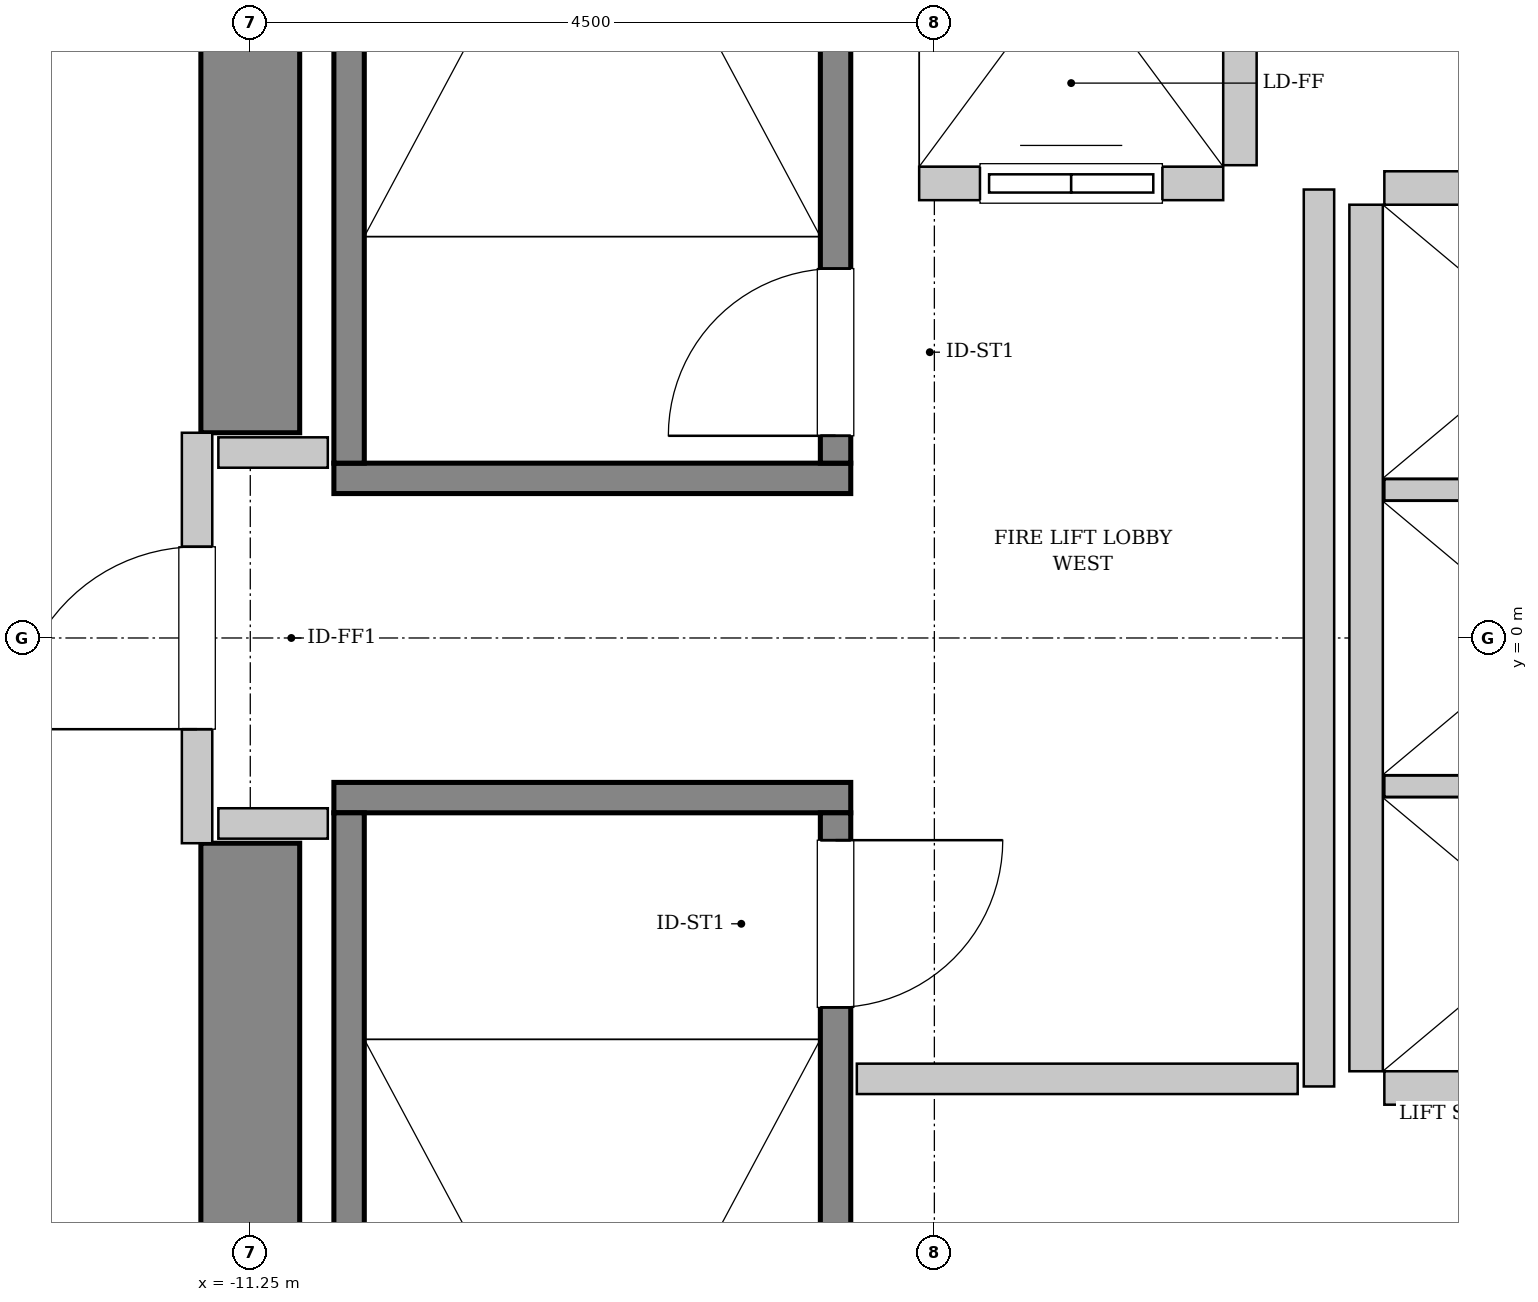
"""IFC4 building model, lengths in metres.
Left out: names, types, materials, properties, quantities, classifications, styles, units other than length and angle.
Written with IfcOpenShell. Run it as: python <this file> out.ifc"""

import sys

from ifc_helpers import new_model, si_unit, direction, frame, frame_2d, origin, place, context, subcontext, project, spatial, rectangle, extrude, source, transform, mapped, element, fill, save


model = new_model("IFC4")
c1 = context("Model", 3, precision=1e-05, world=origin(), true_north=direction((0.0, 1.0)))
c2 = subcontext(c1, "Body", "Model", "MODEL_VIEW")
j1 = project(units=[si_unit("LENGTHUNIT", "METRE"), si_unit("PLANEANGLEUNIT", "RADIAN")], contexts=[c1])
p1 = place(None, origin())
s1 = spatial("IfcSite", under=j1, at=p1, CompositionType="ELEMENT")
p2 = place(p1, origin())
s2 = spatial("IfcBuilding", under=s1, at=p2, CompositionType="ELEMENT")
p3 = place(p2, frame((0.0, 0.0, 16.8)))
s3 = spatial("IfcBuildingStorey", under=s2, at=p3, CompositionType="ELEMENT", Elevation=16.8)
m1 = source(origin(), c2, "Body", "SweptSolid", [
    extrude(rectangle(XDim=7.325, YDim=0.65, at=frame_2d((3.663, 0.0))), origin(), (0.0, 0.0, 1.0), 5.4),
])
for number, where, z_axis, x_axis in (
    (1, (-11.25, -8.675, 0.0), (0.0, 0.0, 1.0), (0.0, 1.0, 0.0)),
    (2, (-11.25, 1.35, 0.0), (0.0, 0.0, 1.0), (0.0, 1.0, 0.0)),
):
    element("IfcWall", number, at=place(p3, frame(where, z_axis=z_axis, x_axis=x_axis)), inside=s3, PredefinedType="SHEAR", context=c2, shape_type="MappedRepresentation", body=[
        mapped(m1, transform((0.0, 0.0, 0.0), x_axis=(1.0, 0.0, 0.0), y_axis=(0.0, 1.0, 0.0), z_axis=(0.0, 0.0, 1.0), scale=1.0)),
    ])
m2 = source(origin(), c2, "Body", "SweptSolid", [
    extrude(rectangle(XDim=3.4, YDim=0.2, at=frame_2d((1.7, 0.0))), origin(), (0.0, 0.0, 1.0), 5.4),
])
p4 = place(p3, frame((-7.3, 1.05, 0.0), z_axis=(0.0, 0.0, 1.0), x_axis=(-1.0, 0.0, 0.0)))
e3 = element("IfcWall", 3, at=p4, inside=s3, PredefinedType="SOLIDWALL", context=c2, shape_type="MappedRepresentation", body=[
    mapped(m2, transform((0.0, 0.0, 0.0), x_axis=(1.0, 0.0, 0.0), y_axis=(0.0, 1.0, 0.0), z_axis=(0.0, 0.0, 1.0), scale=1.0)),
])
m3 = source(origin(), c2, "Body", "SweptSolid", [
    extrude(rectangle(XDim=7.1, YDim=0.2, at=frame_2d((3.55, 0.0))), origin(), (0.0, 0.0, 1.0), 5.4),
])
p5 = place(p3, frame((-7.4, 1.15, 0.0), z_axis=(0.0, 0.0, 1.0), x_axis=(0.0, 1.0, 0.0)))
e4 = element("IfcWall", 4, at=p5, inside=s3, PredefinedType="SOLIDWALL", context=c2, shape_type="MappedRepresentation", body=[
    mapped(m3, transform((0.0, 0.0, 0.0), x_axis=(1.0, 0.0, 0.0), y_axis=(0.0, 1.0, 0.0), z_axis=(0.0, 0.0, 1.0), scale=1.0)),
])
p6 = place(p5, frame((0.18, 0.0, 0.0)))
e5 = element("IfcOpeningElement", 5, at=p6, cuts=e4, PredefinedType="OPENING", context=c2, shape_type="SweptSolid", body=[
    extrude(rectangle(XDim=1.1, YDim=2.15, at=frame_2d((0.55, 1.075))), frame((0.0, 0.11, 0.0), z_axis=(0.0, -1.0, 0.0), x_axis=(1.0, 0.0, 0.0)), (0.0, 0.0, 1.0), 0.22),
])
p7 = place(p3, frame((-10.6, 1.15, 0.0), z_axis=(0.0, 0.0, 1.0), x_axis=(0.0, 1.0, 0.0)))
e6 = element("IfcWall", 6, at=p7, inside=s3, PredefinedType="SOLIDWALL", context=c2, shape_type="MappedRepresentation", body=[
    mapped(m3, transform((0.0, 0.0, 0.0), x_axis=(1.0, 0.0, 0.0), y_axis=(0.0, 1.0, 0.0), z_axis=(0.0, 0.0, 1.0), scale=1.0)),
])
p8 = place(p3, frame((-10.7, -1.05, 0.0), z_axis=(0.0, 0.0, 1.0), x_axis=(1.0, 0.0, 0.0)))
e7 = element("IfcWall", 7, at=p8, inside=s3, PredefinedType="SOLIDWALL", context=c2, shape_type="MappedRepresentation", body=[
    mapped(m2, transform((0.0, 0.0, 0.0), x_axis=(1.0, 0.0, 0.0), y_axis=(0.0, 1.0, 0.0), z_axis=(0.0, 0.0, 1.0), scale=1.0)),
])
p9 = place(p3, frame((-10.6, -1.15, 0.0), z_axis=(0.0, 0.0, 1.0), x_axis=(0.0, -1.0, 0.0)))
e8 = element("IfcWall", 8, at=p9, inside=s3, PredefinedType="SOLIDWALL", context=c2, shape_type="MappedRepresentation", body=[
    mapped(m3, transform((0.0, 0.0, 0.0), x_axis=(1.0, 0.0, 0.0), y_axis=(0.0, 1.0, 0.0), z_axis=(0.0, 0.0, 1.0), scale=1.0)),
])
p10 = place(p3, frame((-7.4, -1.15, 0.0), z_axis=(0.0, 0.0, 1.0), x_axis=(0.0, -1.0, 0.0)))
e9 = element("IfcWall", 9, at=p10, inside=s3, PredefinedType="SOLIDWALL", context=c2, shape_type="MappedRepresentation", body=[
    mapped(m3, transform((0.0, 0.0, 0.0), x_axis=(1.0, 0.0, 0.0), y_axis=(0.0, 1.0, 0.0), z_axis=(0.0, 0.0, 1.0), scale=1.0)),
])
p11 = place(p10, frame((0.18, 0.0, 0.0)))
e10 = element("IfcOpeningElement", 10, at=p11, cuts=e9, PredefinedType="OPENING", context=c2, shape_type="SweptSolid", body=[
    extrude(rectangle(XDim=1.1, YDim=2.15, at=frame_2d((0.55, 1.075))), frame((0.0, 0.11, 0.0), z_axis=(0.0, -1.0, 0.0), x_axis=(1.0, 0.0, 0.0)), (0.0, 0.0, 1.0), 0.22),
])
m4 = source(origin(), c2, "Body", "SweptSolid", [
    extrude(rectangle(XDim=2.0, YDim=0.22, at=frame_2d((1.0, 0.0))), origin(), (0.0, 0.0, 1.0), 5.085),
])
p12 = place(p3, frame((-6.85, 2.99, 0.0), z_axis=(0.0, 0.0, 1.0), x_axis=(1.0, 0.0, 0.0)))
e11 = element("IfcWall", 11, at=p12, inside=s3, PredefinedType="SOLIDWALL", context=c2, shape_type="MappedRepresentation", body=[
    mapped(m4, transform((0.0, 0.0, 0.0), x_axis=(1.0, 0.0, 0.0), y_axis=(0.0, 1.0, 0.0), z_axis=(0.0, 0.0, 1.0), scale=1.0)),
])
p13 = place(p12, frame((0.4, 0.0, 0.0)))
e12 = element("IfcOpeningElement", 12, at=p13, cuts=e11, PredefinedType="OPENING", context=c2, shape_type="SweptSolid", body=[
    extrude(rectangle(XDim=1.2, YDim=2.2, at=frame_2d((0.6, 1.1))), frame((0.0, 0.12, 0.0), z_axis=(0.0, -1.0, 0.0), x_axis=(1.0, 0.0, 0.0)), (0.0, 0.0, 1.0), 0.24),
])
m5 = source(origin(), c2, "Body", "SweptSolid", [
    extrude(rectangle(XDim=2.68, YDim=0.22, at=frame_2d((1.34, 0.0))), origin(), (0.0, 0.0, 1.0), 5.085),
])
p14 = place(p3, frame((-4.74, 3.11, 0.0), z_axis=(0.0, 0.0, 1.0), x_axis=(0.0, 1.0, 0.0)))
e13 = element("IfcWall", 13, at=p14, inside=s3, PredefinedType="SOLIDWALL", context=c2, shape_type="MappedRepresentation", body=[
    mapped(m5, transform((0.0, 0.0, 0.0), x_axis=(1.0, 0.0, 0.0), y_axis=(0.0, 1.0, 0.0), z_axis=(0.0, 0.0, 1.0), scale=1.0)),
])
m6 = source(origin(), c2, "Body", "SweptSolid", [
    extrude(rectangle(XDim=5.7, YDim=0.22, at=frame_2d((2.85, 0.0))), origin(), (0.0, 0.0, 1.0), 5.085),
])
p15 = place(p3, frame((-3.91, 2.85, 0.0), z_axis=(0.0, 0.0, 1.0), x_axis=(0.0, -1.0, 0.0)))
e14 = element("IfcWall", 14, at=p15, inside=s3, PredefinedType="SOLIDWALL", context=c2, shape_type="MappedRepresentation", body=[
    mapped(m6, transform((0.0, 0.0, 0.0), x_axis=(1.0, 0.0, 0.0), y_axis=(0.0, 1.0, 0.0), z_axis=(0.0, 0.0, 1.0), scale=1.0)),
])
m7 = source(origin(), c2, "Body", "SweptSolid", [
    extrude(rectangle(XDim=2.13, YDim=0.22, at=frame_2d((1.065, 0.0))), origin(), (0.0, 0.0, 1.0), 5.085),
])
p16 = place(p3, frame((-3.79, -2.96, 0.0), z_axis=(0.0, 0.0, 1.0), x_axis=(1.0, 0.0, 0.0)))
e15 = element("IfcWall", 15, at=p16, inside=s3, PredefinedType="SOLIDWALL", context=c2, shape_type="MappedRepresentation", body=[
    mapped(m7, transform((0.0, 0.0, 0.0), x_axis=(1.0, 0.0, 0.0), y_axis=(0.0, 1.0, 0.0), z_axis=(0.0, 0.0, 1.0), scale=1.0)),
])
m8 = source(origin(), c2, "Body", "SweptSolid", [
    extrude(rectangle(XDim=2.13, YDim=0.14, at=frame_2d((1.065, 0.0))), origin(), (0.0, 0.0, 1.0), 5.085),
])
for number, where, z_axis, x_axis in (
    (16, (-3.79, -0.975, 0.0), (0.0, 0.0, 1.0), (1.0, 0.0, 0.0)),
    (17, (-3.79, 0.975, 0.0), (0.0, 0.0, 1.0), (1.0, 0.0, 0.0)),
):
    element("IfcWall", number, at=place(p3, frame(where, z_axis=z_axis, x_axis=x_axis)), inside=s3, PredefinedType="PARTITIONING", context=c2, shape_type="MappedRepresentation", body=[
        mapped(m8, transform((0.0, 0.0, 0.0), x_axis=(1.0, 0.0, 0.0), y_axis=(0.0, 1.0, 0.0), z_axis=(0.0, 0.0, 1.0), scale=1.0)),
    ])
p17 = place(p3, frame((-1.66, 2.96, 0.0), z_axis=(0.0, 0.0, 1.0), x_axis=(-1.0, 0.0, 0.0)))
e18 = element("IfcWall", 18, at=p17, inside=s3, PredefinedType="SOLIDWALL", context=c2, shape_type="MappedRepresentation", body=[
    mapped(m7, transform((0.0, 0.0, 0.0), x_axis=(1.0, 0.0, 0.0), y_axis=(0.0, 1.0, 0.0), z_axis=(0.0, 0.0, 1.0), scale=1.0)),
])
m9 = source(origin(), c2, "Body", "SweptSolid", [
    extrude(rectangle(XDim=2.7, YDim=0.2, at=frame_2d((1.35, 0.0))), origin(), (0.0, 0.0, 1.0), 3.975),
])
p18 = place(p3, frame((-11.6, -1.35, 0.0), z_axis=(0.0, 0.0, 1.0), x_axis=(0.0, 1.0, 0.0)))
e19 = element("IfcWall", 19, at=p18, inside=s3, PredefinedType="PARTITIONING", context=c2, shape_type="MappedRepresentation", body=[
    mapped(m9, transform((0.0, 0.0, 0.0), x_axis=(1.0, 0.0, 0.0), y_axis=(0.0, 1.0, 0.0), z_axis=(0.0, 0.0, 1.0), scale=1.0)),
])
p19 = place(p18, frame((0.75, 0.0, 0.0)))
e20 = element("IfcOpeningElement", 20, at=p19, cuts=e19, PredefinedType="OPENING", context=c2, shape_type="SweptSolid", body=[
    extrude(rectangle(XDim=1.2, YDim=2.15, at=frame_2d((0.6, 1.075))), frame((0.0, 0.11, 0.0), z_axis=(0.0, -1.0, 0.0), x_axis=(1.0, 0.0, 0.0)), (0.0, 0.0, 1.0), 0.22),
])
m10 = source(origin(), c2, "Body", "SweptSolid", [
    extrude(rectangle(XDim=5.9, YDim=0.2, at=frame_2d((2.95, 0.0))), origin(), (0.0, 0.0, 1.0), 5.085),
])
p20 = place(p3, frame((-4.22, -2.95, 0.0), z_axis=(0.0, 0.0, 1.0), x_axis=(0.0, 1.0, 0.0)))
e21 = element("IfcWall", 21, at=p20, inside=s3, PredefinedType="PARTITIONING", context=c2, shape_type="MappedRepresentation", body=[
    mapped(m10, transform((0.0, 0.0, 0.0), x_axis=(1.0, 0.0, 0.0), y_axis=(0.0, 1.0, 0.0), z_axis=(0.0, 0.0, 1.0), scale=1.0)),
])
m11 = source(origin(), c2, "Body", "SweptSolid", [
    extrude(rectangle(XDim=2.9, YDim=0.2, at=frame_2d((1.45, 0.0))), origin(), (0.0, 0.0, 1.0), 5.085),
])
p21 = place(p3, frame((-7.26, -2.9, 0.0), z_axis=(0.0, 0.0, 1.0), x_axis=(1.0, 0.0, 0.0)))
e22 = element("IfcWall", 22, at=p21, inside=s3, PredefinedType="PARTITIONING", context=c2, shape_type="MappedRepresentation", body=[
    mapped(m11, transform((0.0, 0.0, 0.0), x_axis=(1.0, 0.0, 0.0), y_axis=(0.0, 1.0, 0.0), z_axis=(0.0, 0.0, 1.0), scale=1.0)),
])
m12 = source(origin(), c2, "Body", "SweptSolid", [
    extrude(rectangle(XDim=0.72, YDim=0.2, at=frame_2d((0.36, 0.0))), origin(), (0.0, 0.0, 1.0), 5.085),
])
for number, where, z_axis, x_axis in (
    (23, (-11.46, 1.22, 0.0), (0.0, 0.0, 1.0), (1.0, 0.0, 0.0)),
    (24, (-11.46, -1.22, 0.0), (0.0, 0.0, 1.0), (1.0, 0.0, 0.0)),
):
    element("IfcWall", number, at=place(p3, frame(where, z_axis=z_axis, x_axis=x_axis)), inside=s3, PredefinedType="PARTITIONING", context=c2, shape_type="MappedRepresentation", body=[
        mapped(m12, transform((0.0, 0.0, 0.0), x_axis=(1.0, 0.0, 0.0), y_axis=(0.0, 1.0, 0.0), z_axis=(0.0, 0.0, 1.0), scale=1.0)),
    ])
m13 = source(origin(), c2, "Body", "SweptSolid", [
    extrude(rectangle(XDim=1.1, YDim=2.15, at=frame_2d((0.55, 1.075))), frame((0.0, 0.025, 0.0), z_axis=(0.0, -1.0, 0.0), x_axis=(1.0, 0.0, 0.0)), (0.0, 0.0, 1.0), 0.05),
])
p22 = place(p6, origin())
e25 = element("IfcDoor", 25, at=p22, inside=s3, OperationType="SINGLE_SWING_LEFT", PredefinedType="DOOR", context=c2, shape_type="MappedRepresentation", body=[
    mapped(m13, transform((0.0, 0.0, 0.0), x_axis=(1.0, 0.0, 0.0), y_axis=(0.0, 1.0, 0.0), z_axis=(0.0, 0.0, 1.0), scale=1.0)),
])
fill(e5, e25)
p23 = place(p11, origin())
e26 = element("IfcDoor", 26, at=p23, inside=s3, OperationType="SINGLE_SWING_LEFT", PredefinedType="DOOR", context=c2, shape_type="MappedRepresentation", body=[
    mapped(m13, transform((0.0, 0.0, 0.0), x_axis=(1.0, 0.0, 0.0), y_axis=(0.0, 1.0, 0.0), z_axis=(0.0, 0.0, 1.0), scale=1.0)),
])
fill(e10, e26)
m14 = source(origin(), c2, "Body", "SweptSolid", [
    extrude(rectangle(XDim=1.2, YDim=2.2, at=frame_2d((0.6, 1.1))), frame((0.0, 0.025, 0.0), z_axis=(0.0, -1.0, 0.0), x_axis=(1.0, 0.0, 0.0)), (0.0, 0.0, 1.0), 0.05),
])
p24 = place(p13, origin())
e27 = element("IfcDoor", 27, at=p24, inside=s3, OperationType="SLIDING_TO_LEFT", PredefinedType="DOOR", context=c2, shape_type="MappedRepresentation", body=[
    mapped(m14, transform((0.0, 0.0, 0.0), x_axis=(1.0, 0.0, 0.0), y_axis=(0.0, 1.0, 0.0), z_axis=(0.0, 0.0, 1.0), scale=1.0)),
])
fill(e12, e27)
m15 = source(origin(), c2, "Body", "SweptSolid", [
    extrude(rectangle(XDim=1.2, YDim=2.15, at=frame_2d((0.6, 1.075))), frame((0.0, 0.025, 0.0), z_axis=(0.0, -1.0, 0.0), x_axis=(1.0, 0.0, 0.0)), (0.0, 0.0, 1.0), 0.05),
])
p25 = place(p19, origin())
e28 = element("IfcDoor", 28, at=p25, inside=s3, OperationType="SINGLE_SWING_LEFT", PredefinedType="DOOR", context=c2, shape_type="MappedRepresentation", body=[
    mapped(m15, transform((0.0, 0.0, 0.0), x_axis=(1.0, 0.0, 0.0), y_axis=(0.0, 1.0, 0.0), z_axis=(0.0, 0.0, 1.0), scale=1.0)),
])
fill(e20, e28)
save(model, sys.argv[1])
